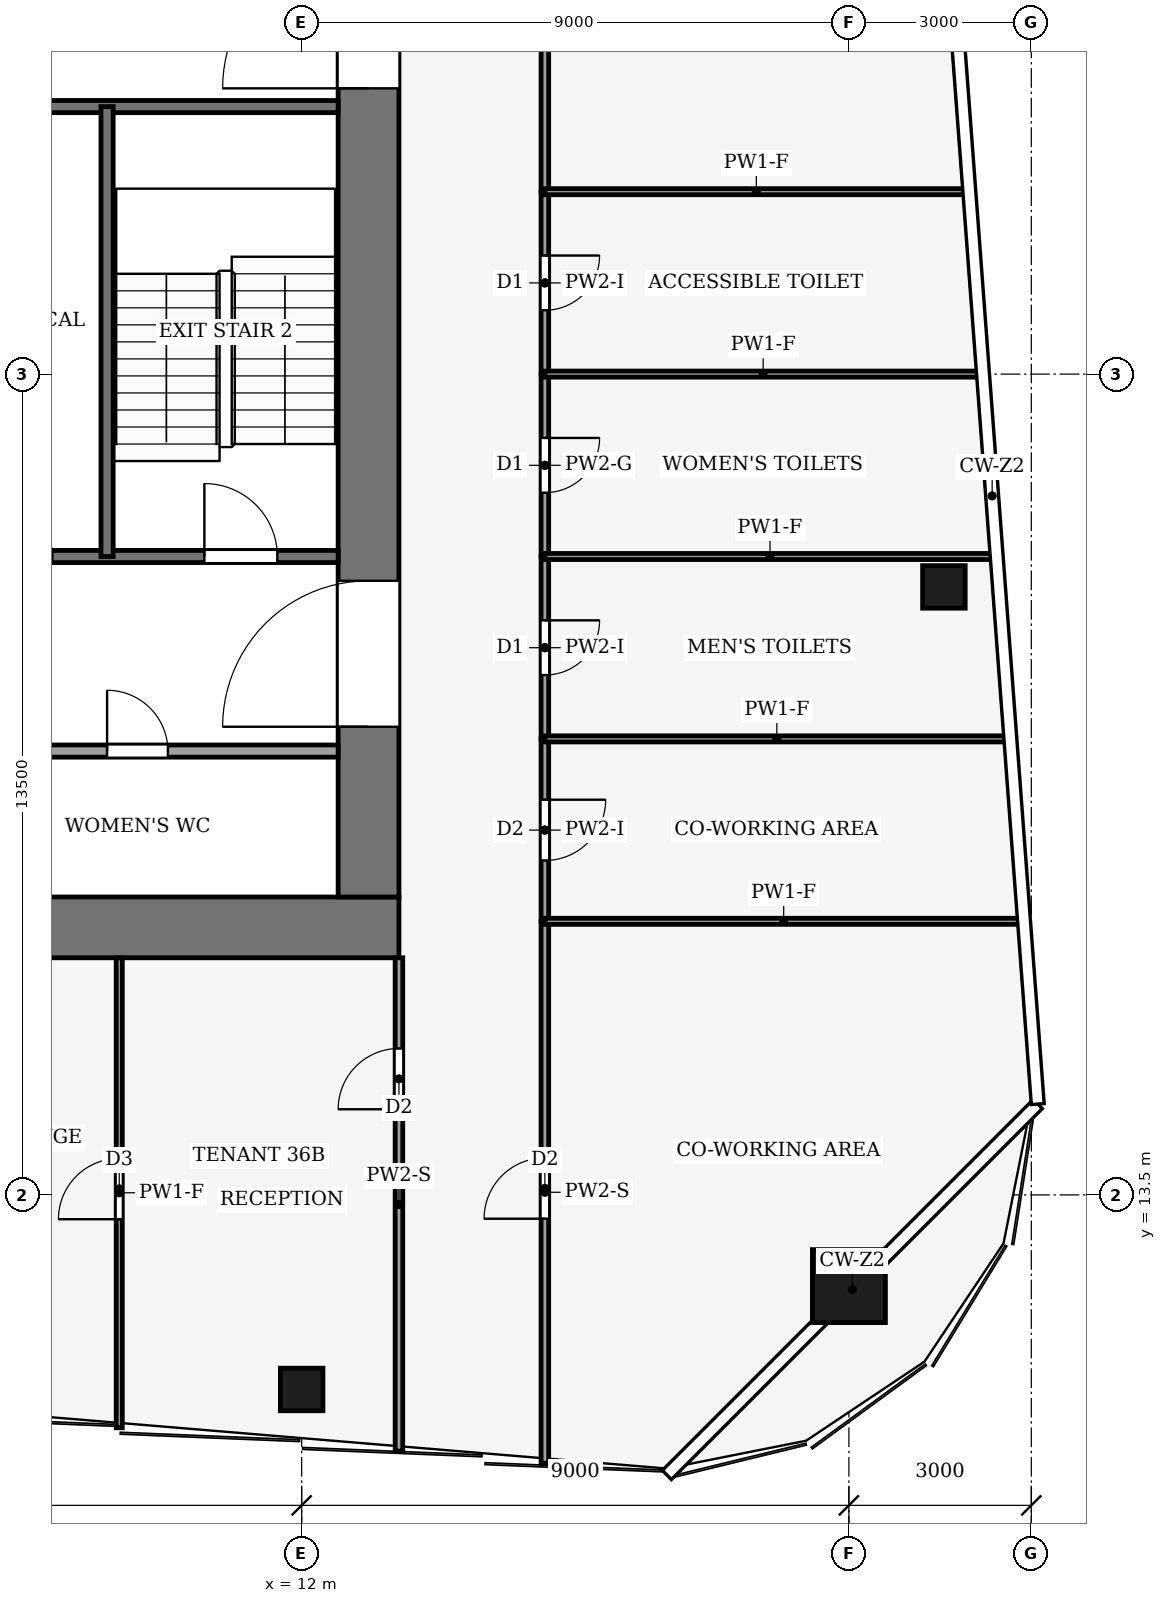
"""IFC4 building model, lengths in metres.
Left out: names, types, materials, properties, quantities, classifications, styles, units other than length and angle.
Written with IfcOpenShell. Run it as: python <this file> out.ifc"""

import sys

from ifc_helpers import new_model, si_unit, direction, frame, frame_2d, origin, origin_2d, place, context, subcontext, project, spatial, rectangle, hollow_rectangle, extrude, element, fill, save


model = new_model("IFC4")
c1 = context("Model", 3, precision=1e-05, world=origin(), true_north=direction((0.0, 1.0)))
c2 = subcontext(c1, "Body", "Model", "MODEL_VIEW")
j1 = project(units=[si_unit("LENGTHUNIT", "METRE"), si_unit("PLANEANGLEUNIT", "RADIAN")], contexts=[c1])
p1 = place(None, origin())
s1 = spatial("IfcSite", under=j1, at=p1, CompositionType="ELEMENT")
p2 = place(p1, origin())
s2 = spatial("IfcBuilding", under=s1, at=p2, CompositionType="ELEMENT")
p3 = place(p2, frame((0.0, 0.0, 158.0)))
s3 = spatial("IfcBuildingStorey", under=s2, at=p3, CompositionType="ELEMENT", Elevation=158.0)
p4 = place(p3, frame((-13.6, 17.9, -0.13), z_axis=(0.0, 0.0, 1.0), x_axis=(1.0, 0.0, 0.0)))
e1 = element("IfcWall", 1, at=p4, inside=s3, PredefinedType="SHEAR", context=c2, shape_type="SweptSolid", body=[
    extrude(rectangle(XDim=27.2, YDim=1.0, at=frame_2d((13.6, 0.0))), origin(), (0.0, 0.0, 1.0), 4.0),
])
p5 = place(p3, frame((13.1, 18.4, -0.13), z_axis=(0.0, 0.0, 1.0), x_axis=(0.0, 1.0, 0.0)))
e2 = element("IfcWall", 2, at=p5, inside=s3, PredefinedType="SHEAR", context=c2, shape_type="SweptSolid", body=[
    extrude(rectangle(XDim=19.2, YDim=1.0, at=frame_2d((9.6, 0.0))), origin(), (0.0, 0.0, 1.0), 4.0),
])
p6 = place(p5, frame((2.8, 0.0, 0.13)))
e3 = element("IfcOpeningElement", 3, at=p6, cuts=e2, PredefinedType="OPENING", context=c2, shape_type="SweptSolid", body=[
    extrude(rectangle(XDim=2.4, YDim=2.4, at=frame_2d((1.2, 1.2))), frame((0.0, 0.51, 0.0), z_axis=(0.0, -1.0, 0.0), x_axis=(1.0, 0.0, 0.0)), (0.0, 0.0, 1.0), 1.02),
])
p7 = place(p5, frame((13.3, 0.0, 0.13)))
e4 = element("IfcOpeningElement", 4, at=p7, cuts=e2, PredefinedType="OPENING", context=c2, shape_type="SweptSolid", body=[
    extrude(rectangle(XDim=2.4, YDim=2.4, at=frame_2d((1.2, 1.2))), frame((0.0, 0.51, 0.0), z_axis=(0.0, -1.0, 0.0), x_axis=(1.0, 0.0, 0.0)), (0.0, 0.0, 1.0), 1.02),
])
p8 = place(p3, frame((21.0, 12.0, 0.0), z_axis=(0.0, 0.0, 1.0), x_axis=(1.0, 0.0, 0.0)))
e5 = element("IfcColumn", 5, at=p8, inside=s3, PredefinedType="COLUMN", context=c2, shape_type="SweptSolid", body=[
    extrude(hollow_rectangle(XDim=1.2, YDim=1.2, WallThickness=0.07, at=origin_2d()), origin(), (0.0, 0.0, 1.0), 4.0),
])
for number, where, z_axis, x_axis in (
    (6, (12.0, 10.3, 0.0), (0.0, 0.0, 1.0), (1.0, 0.0, 0.0)),
    (7, (22.562, 23.5, 0.0), (0.0, 0.0, 1.0), (1.0, 0.0, 0.0)),
):
    element("IfcColumn", number, at=place(p3, frame(where, z_axis=z_axis, x_axis=x_axis)), inside=s3, PredefinedType="COLUMN", context=c2, shape_type="SweptSolid", body=[
        extrude(hollow_rectangle(XDim=0.7, YDim=0.7, WallThickness=0.03, at=origin_2d()), origin(), (0.0, 0.0, 1.0), 4.0),
    ])
p9 = place(p3, frame((6.0, 20.8, 0.0), z_axis=(0.0, 0.0, 1.0), x_axis=(1.0, 0.0, 0.0)))
e8 = element("IfcWall", 8, at=p9, inside=s3, PredefinedType="PARTITIONING", context=c2, shape_type="SweptSolid", body=[
    extrude(rectangle(XDim=6.6, YDim=0.2, at=frame_2d((3.3, 0.0))), origin(), (0.0, 0.0, 1.0), 3.87),
])
p10 = place(p9, frame((2.8, 0.0, 0.0)))
e9 = element("IfcOpeningElement", 9, at=p10, cuts=e8, PredefinedType="OPENING", context=c2, shape_type="SweptSolid", body=[
    extrude(rectangle(XDim=1.0, YDim=2.1, at=frame_2d((0.5, 1.05))), frame((0.0, 0.11, 0.0), z_axis=(0.0, -1.0, 0.0), x_axis=(1.0, 0.0, 0.0)), (0.0, 0.0, 1.0), 0.22),
])
p11 = place(p3, frame((6.0, 24.0, 0.0), z_axis=(0.0, 0.0, 1.0), x_axis=(1.0, 0.0, 0.0)))
e10 = element("IfcWall", 10, at=p11, inside=s3, PredefinedType="PARTITIONING", context=c2, shape_type="SweptSolid", body=[
    extrude(rectangle(XDim=6.6, YDim=0.2, at=frame_2d((3.3, 0.0))), origin(), (0.0, 0.0, 1.0), 3.87),
])
p12 = place(p11, frame((0.9, 0.0, 0.0)))
e11 = element("IfcOpeningElement", 11, at=p12, cuts=e10, PredefinedType="OPENING", context=c2, shape_type="SweptSolid", body=[
    extrude(rectangle(XDim=1.0, YDim=2.1, at=frame_2d((0.5, 1.05))), frame((0.0, 0.11, 0.0), z_axis=(0.0, -1.0, 0.0), x_axis=(1.0, 0.0, 0.0)), (0.0, 0.0, 1.0), 0.22),
])
p13 = place(p11, frame((4.4, 0.0, 0.0)))
e12 = element("IfcOpeningElement", 12, at=p13, cuts=e10, PredefinedType="OPENING", context=c2, shape_type="SweptSolid", body=[
    extrude(rectangle(XDim=1.2, YDim=2.2, at=frame_2d((0.6, 1.1))), frame((0.0, 0.11, 0.0), z_axis=(0.0, -1.0, 0.0), x_axis=(1.0, 0.0, 0.0)), (0.0, 0.0, 1.0), 0.22),
])
p14 = place(p3, frame((6.0, 31.4, 0.0), z_axis=(0.0, 0.0, 1.0), x_axis=(1.0, 0.0, 0.0)))
e13 = element("IfcWall", 13, at=p14, inside=s3, PredefinedType="PARTITIONING", context=c2, shape_type="SweptSolid", body=[
    extrude(rectangle(XDim=6.6, YDim=0.2, at=frame_2d((3.3, 0.0))), origin(), (0.0, 0.0, 1.0), 3.87),
])
p15 = place(p3, frame((8.8, 24.0, 0.0), z_axis=(0.0, 0.0, 1.0), x_axis=(0.0, 1.0, 0.0)))
e14 = element("IfcWall", 14, at=p15, inside=s3, PredefinedType="PARTITIONING", context=c2, shape_type="SweptSolid", body=[
    extrude(rectangle(XDim=7.4, YDim=0.2, at=frame_2d((3.7, 0.0))), origin(), (0.0, 0.0, 1.0), 3.87),
])
p16 = place(p3, frame((16.0, 9.087, 0.0), z_axis=(0.0, 0.0, 1.0), x_axis=(0.0, 1.0, 0.0)))
e15 = element("IfcWall", 15, at=p16, inside=s3, PredefinedType="PARTITIONING", context=c2, shape_type="SweptSolid", body=[
    extrude(rectangle(XDim=8.913, YDim=0.125, at=frame_2d((4.457, 0.0))), origin(), (0.0, 0.0, 1.0), 3.04),
])
p17 = place(p16, frame((4.022, 0.0, 0.0)))
e16 = element("IfcOpeningElement", 16, at=p17, cuts=e15, PredefinedType="OPENING", context=c2, shape_type="SweptSolid", body=[
    extrude(rectangle(XDim=1.0, YDim=2.1, at=frame_2d((0.5, 1.05))), frame((0.0, 0.073, 0.0), z_axis=(0.0, -1.0, 0.0), x_axis=(1.0, 0.0, 0.0)), (0.0, 0.0, 1.0), 0.145),
])
p18 = place(p3, frame((16.0, 21.0, 0.0), z_axis=(0.0, 0.0, 1.0), x_axis=(0.0, -1.0, 0.0)))
e17 = element("IfcWall", 17, at=p18, inside=s3, PredefinedType="PARTITIONING", context=c2, shape_type="SweptSolid", body=[
    extrude(rectangle(XDim=3.0, YDim=0.125, at=frame_2d((1.5, 0.0))), origin(), (0.0, 0.0, 1.0), 3.48),
])
p19 = place(p18, frame((1.0, 0.0, 0.0)))
e18 = element("IfcOpeningElement", 18, at=p19, cuts=e17, PredefinedType="OPENING", context=c2, shape_type="SweptSolid", body=[
    extrude(rectangle(XDim=1.0, YDim=2.1, at=frame_2d((0.5, 1.05))), frame((0.0, 0.073, 0.0), z_axis=(0.0, -1.0, 0.0), x_axis=(1.0, 0.0, 0.0)), (0.0, 0.0, 1.0), 0.145),
])
p20 = place(p3, frame((16.0, 24.0, 0.0), z_axis=(0.0, 0.0, 1.0), x_axis=(0.0, -1.0, 0.0)))
e19 = element("IfcWall", 19, at=p20, inside=s3, PredefinedType="PARTITIONING", context=c2, shape_type="SweptSolid", body=[
    extrude(rectangle(XDim=3.0, YDim=0.125, at=frame_2d((1.5, 0.0))), origin(), (0.0, 0.0, 1.0), 3.48),
])
p21 = place(p20, frame((1.05, 0.0, 0.0)))
e20 = element("IfcOpeningElement", 20, at=p21, cuts=e19, PredefinedType="OPENING", context=c2, shape_type="SweptSolid", body=[
    extrude(rectangle(XDim=0.9, YDim=2.1, at=frame_2d((0.45, 1.05))), frame((0.0, 0.073, 0.0), z_axis=(0.0, -1.0, 0.0), x_axis=(1.0, 0.0, 0.0)), (0.0, 0.0, 1.0), 0.145),
])
p22 = place(p3, frame((16.0, 27.0, 0.0), z_axis=(0.0, 0.0, 1.0), x_axis=(0.0, -1.0, 0.0)))
e21 = element("IfcWall", 21, at=p22, inside=s3, PredefinedType="PARTITIONING", context=c2, shape_type="SweptSolid", body=[
    extrude(rectangle(XDim=3.0, YDim=0.125, at=frame_2d((1.5, 0.0))), origin(), (0.0, 0.0, 1.0), 3.87),
])
p23 = place(p22, frame((1.05, 0.0, 0.0)))
e22 = element("IfcOpeningElement", 22, at=p23, cuts=e21, PredefinedType="OPENING", context=c2, shape_type="SweptSolid", body=[
    extrude(rectangle(XDim=0.9, YDim=2.1, at=frame_2d((0.45, 1.05))), frame((0.0, 0.073, 0.0), z_axis=(0.0, -1.0, 0.0), x_axis=(1.0, 0.0, 0.0)), (0.0, 0.0, 1.0), 0.145),
])
p24 = place(p3, frame((16.0, 30.0, 0.0), z_axis=(0.0, 0.0, 1.0), x_axis=(0.0, -1.0, 0.0)))
e23 = element("IfcWall", 23, at=p24, inside=s3, PredefinedType="PARTITIONING", context=c2, shape_type="SweptSolid", body=[
    extrude(rectangle(XDim=3.0, YDim=0.125, at=frame_2d((1.5, 0.0))), origin(), (0.0, 0.0, 1.0), 3.48),
])
p25 = place(p24, frame((1.05, 0.0, 0.0)))
e24 = element("IfcOpeningElement", 24, at=p25, cuts=e23, PredefinedType="OPENING", context=c2, shape_type="SweptSolid", body=[
    extrude(rectangle(XDim=0.9, YDim=2.1, at=frame_2d((0.45, 1.05))), frame((0.0, 0.073, 0.0), z_axis=(0.0, -1.0, 0.0), x_axis=(1.0, 0.0, 0.0)), (0.0, 0.0, 1.0), 0.145),
])
p26 = place(p3, frame((16.0, 39.0, 0.0), z_axis=(0.0, 0.0, 1.0), x_axis=(0.0, -1.0, 0.0)))
e25 = element("IfcWall", 25, at=p26, inside=s3, PredefinedType="PARTITIONING", context=c2, shape_type="SweptSolid", body=[
    extrude(rectangle(XDim=9.0, YDim=0.125, at=frame_2d((4.5, 0.0))), origin(), (0.0, 0.0, 1.0), 3.14),
])
p27 = place(p26, frame((4.0, 0.0, 0.0)))
e26 = element("IfcOpeningElement", 26, at=p27, cuts=e25, PredefinedType="OPENING", context=c2, shape_type="SweptSolid", body=[
    extrude(rectangle(XDim=1.0, YDim=2.1, at=frame_2d((0.5, 1.05))), frame((0.0, 0.073, 0.0), z_axis=(0.0, -1.0, 0.0), x_axis=(1.0, 0.0, 0.0)), (0.0, 0.0, 1.0), 0.145),
])
p28 = place(p3, frame((13.6, 9.287, 0.0), z_axis=(0.0, 0.0, 1.0), x_axis=(0.0, 1.0, 0.0)))
e27 = element("IfcWall", 27, at=p28, inside=s3, PredefinedType="PARTITIONING", context=c2, shape_type="SweptSolid", body=[
    extrude(rectangle(XDim=8.113, YDim=0.125, at=frame_2d((4.057, 0.0))), origin(), (0.0, 0.0, 1.0), 3.04),
])
p29 = place(p28, frame((5.622, 0.0, 0.0)))
e28 = element("IfcOpeningElement", 28, at=p29, cuts=e27, PredefinedType="OPENING", context=c2, shape_type="SweptSolid", body=[
    extrude(rectangle(XDim=1.0, YDim=2.1, at=frame_2d((0.5, 1.05))), frame((0.0, 0.073, 0.0), z_axis=(0.0, -1.0, 0.0), x_axis=(1.0, 0.0, 0.0)), (0.0, 0.0, 1.0), 0.145),
])
p30 = place(p3, frame((23.855, 18.0, 0.0), z_axis=(0.0, 0.0, 1.0), x_axis=(-1.0, 0.0, 0.0)))
e29 = element("IfcWall", 29, at=p30, inside=s3, PredefinedType="PARTITIONING", context=c2, shape_type="SweptSolid", body=[
    extrude(rectangle(XDim=7.855, YDim=0.1, at=frame_2d((3.927, 0.0))), origin(), (0.0, 0.0, 1.0), 3.04),
])
p31 = place(p3, frame((23.63, 21.0, 0.0), z_axis=(0.0, 0.0, 1.0), x_axis=(-1.0, 0.0, 0.0)))
e30 = element("IfcWall", 30, at=p31, inside=s3, PredefinedType="PARTITIONING", context=c2, shape_type="SweptSolid", body=[
    extrude(rectangle(XDim=7.63, YDim=0.1, at=frame_2d((3.815, 0.0))), origin(), (0.0, 0.0, 1.0), 3.04),
])
p32 = place(p3, frame((23.405, 24.0, 0.0), z_axis=(0.0, 0.0, 1.0), x_axis=(-1.0, 0.0, 0.0)))
e31 = element("IfcWall", 31, at=p32, inside=s3, PredefinedType="PARTITIONING", context=c2, shape_type="SweptSolid", body=[
    extrude(rectangle(XDim=7.405, YDim=0.1, at=frame_2d((3.703, 0.0))), origin(), (0.0, 0.0, 1.0), 3.04),
])
p33 = place(p3, frame((23.18, 27.0, 0.0), z_axis=(0.0, 0.0, 1.0), x_axis=(-1.0, 0.0, 0.0)))
e32 = element("IfcWall", 32, at=p33, inside=s3, PredefinedType="PARTITIONING", context=c2, shape_type="SweptSolid", body=[
    extrude(rectangle(XDim=7.18, YDim=0.1, at=frame_2d((3.59, 0.0))), origin(), (0.0, 0.0, 1.0), 3.04),
])
p34 = place(p3, frame((22.955, 30.0, 0.0), z_axis=(0.0, 0.0, 1.0), x_axis=(-1.0, 0.0, 0.0)))
e33 = element("IfcWall", 33, at=p34, inside=s3, PredefinedType="PARTITIONING", context=c2, shape_type="SweptSolid", body=[
    extrude(rectangle(XDim=6.955, YDim=0.1, at=frame_2d((3.478, 0.0))), origin(), (0.0, 0.0, 1.0), 3.04),
])
p35 = place(p3, frame((9.0, 9.67, 0.0), z_axis=(0.0, 0.0, 1.0), x_axis=(0.0, 1.0, 0.0)))
e34 = element("IfcWall", 34, at=p35, inside=s3, PredefinedType="PARTITIONING", context=c2, shape_type="SweptSolid", body=[
    extrude(rectangle(XDim=7.73, YDim=0.1, at=frame_2d((3.865, 0.0))), origin(), (0.0, 0.0, 1.0), 3.04),
])
p36 = place(p35, frame((3.43, 0.0, 0.0)))
e35 = element("IfcOpeningElement", 35, at=p36, cuts=e34, PredefinedType="OPENING", context=c2, shape_type="SweptSolid", body=[
    extrude(rectangle(XDim=1.0, YDim=2.1, at=frame_2d((0.5, 1.05))), frame((0.0, 0.06, 0.0), z_axis=(0.0, -1.0, 0.0), x_axis=(1.0, 0.0, 0.0)), (0.0, 0.0, 1.0), 0.12),
])
p37 = place(p10, origin())
e36 = element("IfcDoor", 36, at=p37, inside=s3, OperationType="SINGLE_SWING_RIGHT", PredefinedType="DOOR", context=c2, shape_type="SweptSolid", body=[
    extrude(rectangle(XDim=1.0, YDim=2.1, at=frame_2d((0.5, 1.05))), frame((0.0, 0.025, 0.0), z_axis=(0.0, -1.0, 0.0), x_axis=(1.0, 0.0, 0.0)), (0.0, 0.0, 1.0), 0.05),
])
fill(e9, e36)
p38 = place(p13, origin())
e37 = element("IfcDoor", 37, at=p38, inside=s3, OperationType="SINGLE_SWING_LEFT", PredefinedType="DOOR", context=c2, shape_type="SweptSolid", body=[
    extrude(rectangle(XDim=1.2, YDim=2.2, at=frame_2d((0.6, 1.1))), frame((0.0, 0.025, 0.0), z_axis=(0.0, -1.0, 0.0), x_axis=(1.0, 0.0, 0.0)), (0.0, 0.0, 1.0), 0.05),
])
fill(e12, e37)
p39 = place(p6, origin())
e38 = element("IfcDoor", 38, at=p39, inside=s3, OperationType="DOUBLE_DOOR_SINGLE_SWING", PredefinedType="DOOR", context=c2, shape_type="SweptSolid", body=[
    extrude(rectangle(XDim=2.4, YDim=2.4, at=frame_2d((1.2, 1.2))), frame((0.0, 0.025, 0.0), z_axis=(0.0, -1.0, 0.0), x_axis=(1.0, 0.0, 0.0)), (0.0, 0.0, 1.0), 0.05),
])
fill(e3, e38)
p40 = place(p7, origin())
e39 = element("IfcDoor", 39, at=p40, inside=s3, OperationType="DOUBLE_DOOR_SINGLE_SWING", PredefinedType="DOOR", context=c2, shape_type="SweptSolid", body=[
    extrude(rectangle(XDim=2.4, YDim=2.4, at=frame_2d((1.2, 1.2))), frame((0.0, 0.025, 0.0), z_axis=(0.0, -1.0, 0.0), x_axis=(1.0, 0.0, 0.0)), (0.0, 0.0, 1.0), 0.05),
])
fill(e4, e39)
p41 = place(p17, origin())
e40 = element("IfcDoor", 40, at=p41, inside=s3, OperationType="SINGLE_SWING_RIGHT", PredefinedType="DOOR", context=c2, shape_type="SweptSolid", body=[
    extrude(rectangle(XDim=1.0, YDim=2.1, at=frame_2d((0.5, 1.05))), frame((0.0, 0.025, 0.0), z_axis=(0.0, -1.0, 0.0), x_axis=(1.0, 0.0, 0.0)), (0.0, 0.0, 1.0), 0.05),
])
fill(e16, e40)
p42 = place(p19, origin())
e41 = element("IfcDoor", 41, at=p42, inside=s3, OperationType="SINGLE_SWING_RIGHT", PredefinedType="DOOR", context=c2, shape_type="SweptSolid", body=[
    extrude(rectangle(XDim=1.0, YDim=2.1, at=frame_2d((0.5, 1.05))), frame((0.0, 0.025, 0.0), z_axis=(0.0, -1.0, 0.0), x_axis=(1.0, 0.0, 0.0)), (0.0, 0.0, 1.0), 0.05),
])
fill(e18, e41)
p43 = place(p21, origin())
e42 = element("IfcDoor", 42, at=p43, inside=s3, OperationType="SINGLE_SWING_LEFT", PredefinedType="DOOR", context=c2, shape_type="SweptSolid", body=[
    extrude(rectangle(XDim=0.9, YDim=2.1, at=frame_2d((0.45, 1.05))), frame((0.0, 0.025, 0.0), z_axis=(0.0, -1.0, 0.0), x_axis=(1.0, 0.0, 0.0)), (0.0, 0.0, 1.0), 0.05),
])
fill(e20, e42)
p44 = place(p23, origin())
e43 = element("IfcDoor", 43, at=p44, inside=s3, OperationType="SINGLE_SWING_RIGHT", PredefinedType="DOOR", context=c2, shape_type="SweptSolid", body=[
    extrude(rectangle(XDim=0.9, YDim=2.1, at=frame_2d((0.45, 1.05))), frame((0.0, 0.025, 0.0), z_axis=(0.0, -1.0, 0.0), x_axis=(1.0, 0.0, 0.0)), (0.0, 0.0, 1.0), 0.05),
])
fill(e22, e43)
p45 = place(p25, origin())
e44 = element("IfcDoor", 44, at=p45, inside=s3, OperationType="SINGLE_SWING_LEFT", PredefinedType="DOOR", context=c2, shape_type="SweptSolid", body=[
    extrude(rectangle(XDim=0.9, YDim=2.1, at=frame_2d((0.45, 1.05))), frame((0.0, 0.025, 0.0), z_axis=(0.0, -1.0, 0.0), x_axis=(1.0, 0.0, 0.0)), (0.0, 0.0, 1.0), 0.05),
])
fill(e24, e44)
p46 = place(p29, origin())
e45 = element("IfcDoor", 45, at=p46, inside=s3, OperationType="SINGLE_SWING_RIGHT", PredefinedType="DOOR", context=c2, shape_type="SweptSolid", body=[
    extrude(rectangle(XDim=1.0, YDim=2.1, at=frame_2d((0.5, 1.05))), frame((0.0, 0.025, 0.0), z_axis=(0.0, -1.0, 0.0), x_axis=(1.0, 0.0, 0.0)), (0.0, 0.0, 1.0), 0.05),
])
fill(e28, e45)
p47 = place(p36, origin())
e46 = element("IfcDoor", 46, at=p47, inside=s3, OperationType="SINGLE_SWING_RIGHT", PredefinedType="DOOR", context=c2, shape_type="SweptSolid", body=[
    extrude(rectangle(XDim=1.0, YDim=2.1, at=frame_2d((0.5, 1.05))), frame((0.0, 0.025, 0.0), z_axis=(0.0, -1.0, 0.0), x_axis=(1.0, 0.0, 0.0)), (0.0, 0.0, 1.0), 0.05),
])
fill(e35, e46)
save(model, sys.argv[1])
